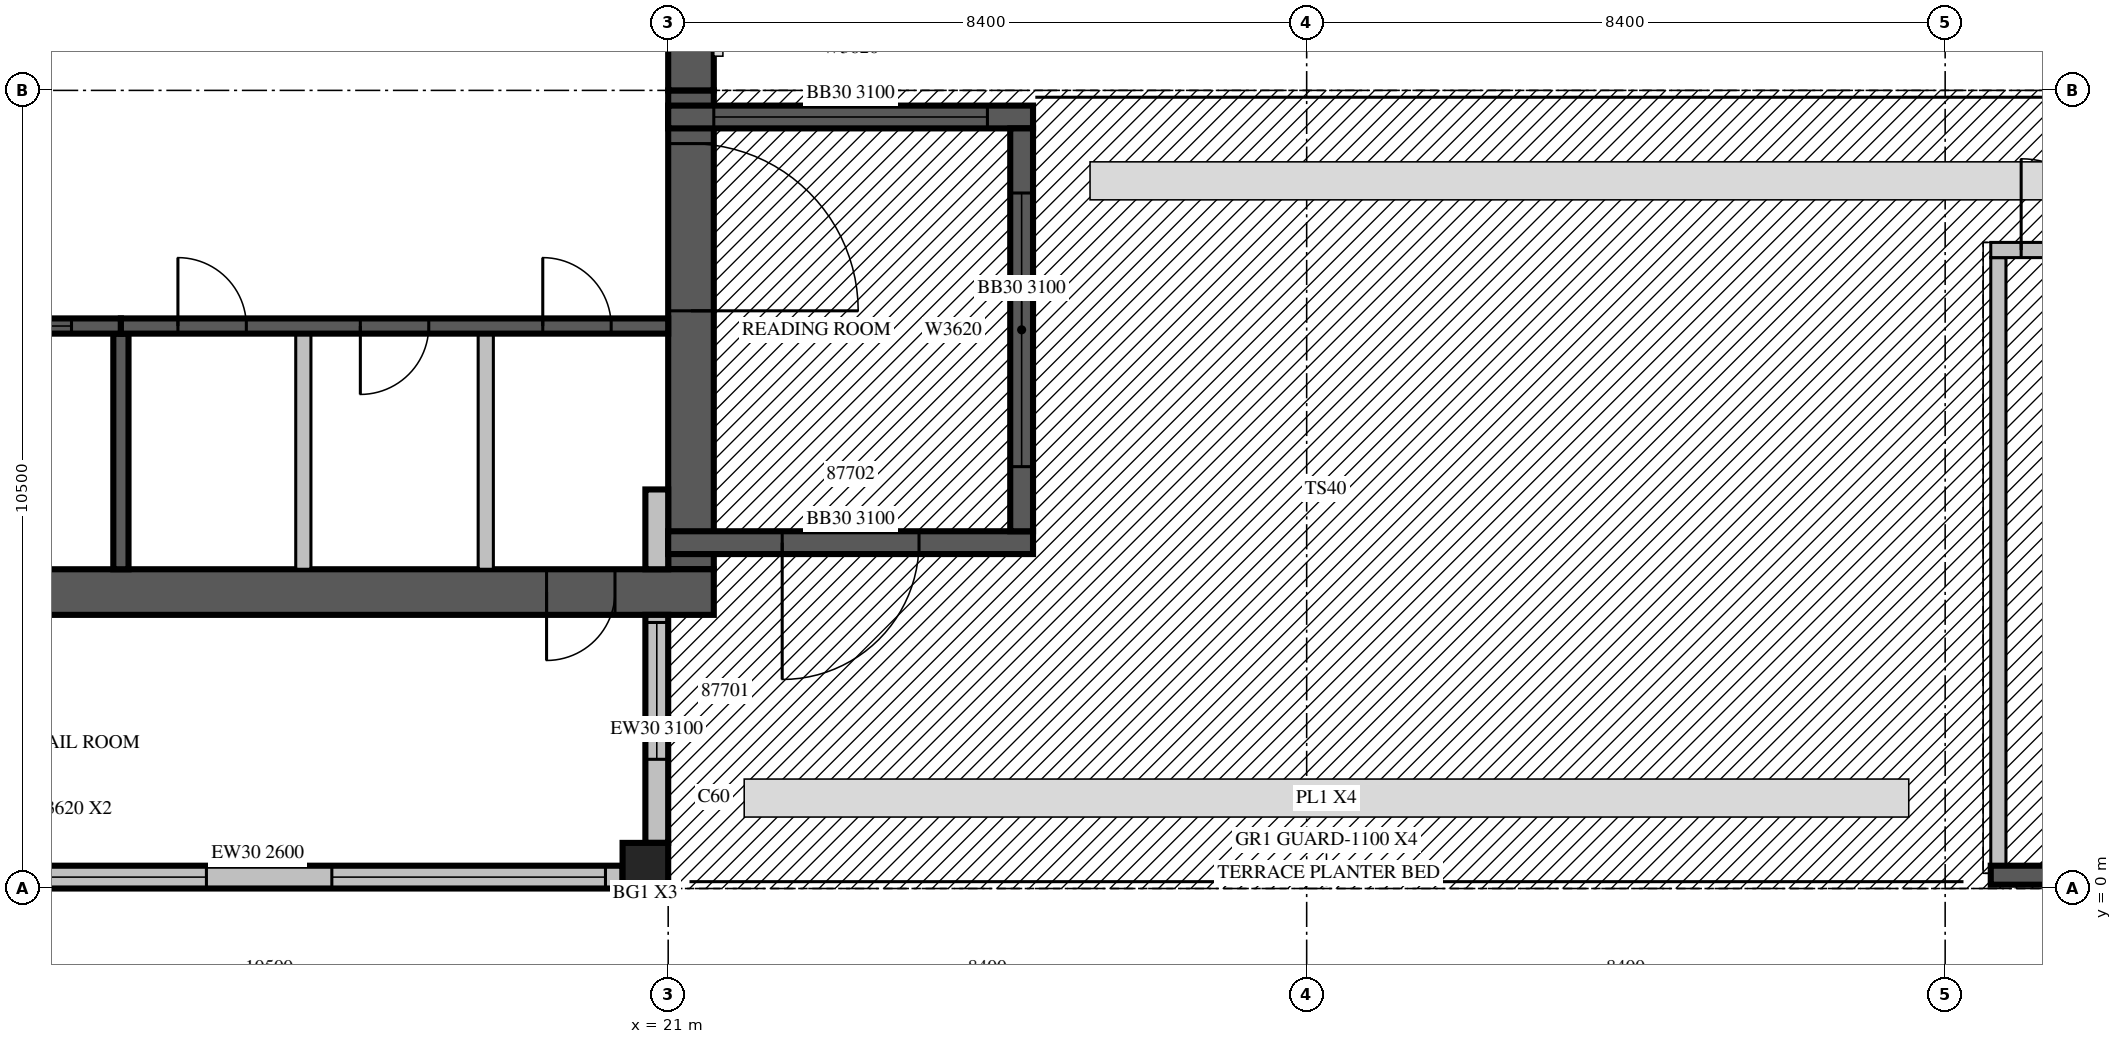
"""IFC4 building model, lengths in metres.
Left out: names, types, materials, properties, quantities, classifications, styles, units other than length and angle.
Written with IfcOpenShell. Run it as: python <this file> out.ifc"""

import sys

from ifc_helpers import new_model, si_unit, direction, frame, frame_2d, origin, origin_2d, place, context, subcontext, project, spatial, rectangle, extrude, source, transform, mapped, element, fill, save


model = new_model("IFC4")
c1 = context("Model", 3, precision=1e-05, world=origin(), true_north=direction((0.0, 1.0)))
c2 = subcontext(c1, "Body", "Model", "MODEL_VIEW")
j1 = project(units=[si_unit("LENGTHUNIT", "METRE"), si_unit("PLANEANGLEUNIT", "RADIAN")], contexts=[c1])
p1 = place(None, origin())
s1 = spatial("IfcSite", under=j1, at=p1, CompositionType="ELEMENT")
p2 = place(p1, origin())
s2 = spatial("IfcBuilding", under=s1, at=p2, CompositionType="ELEMENT")
p3 = place(p2, frame((0.0, 0.0, 330.0)))
s3 = spatial("IfcBuildingStorey", under=s2, at=p3, CompositionType="ELEMENT", Elevation=330.0)
m1 = source(origin(), c2, "Body", "SweptSolid", [
    extrude(rectangle(XDim=0.6, YDim=0.6, at=origin_2d()), origin(), (0.0, 0.0, 1.0), 3.5),
])
p4 = place(p3, frame((20.7, 0.3, 0.0), z_axis=(0.0, 0.0, 1.0), x_axis=(1.0, 0.0, 0.0)))
e1 = element("IfcColumn", 1, at=p4, inside=s3, PredefinedType="COLUMN", context=c2, shape_type="MappedRepresentation", body=[
    mapped(m1, transform((0.0, 0.0, 0.0), scale=1.0)),
])
m2 = source(origin(), c2, "Body", "SweptSolid", [
    extrude(rectangle(XDim=6.3, YDim=0.6, at=frame_2d((3.15, 0.0))), origin(), (0.0, 0.0, 1.0), 3.5),
])
p5 = place(p3, frame((21.3, 4.2, 0.0), z_axis=(0.0, 0.0, 1.0), x_axis=(0.0, 1.0, 0.0)))
e2 = element("IfcWall", 2, at=p5, inside=s3, PredefinedType="SHEAR", context=c2, shape_type="MappedRepresentation", body=[
    mapped(m2, transform((0.0, 0.0, 0.0), scale=1.0)),
])
m3 = source(origin(), c2, "Body", "SweptSolid", [
    extrude(rectangle(XDim=2.2, YDim=2.1, at=frame_2d((1.1, 1.05))), frame((0.0, 0.31, 0.0), z_axis=(0.0, -1.0, 0.0), x_axis=(1.0, 0.0, 0.0)), (0.0, 0.0, 1.0), 0.62),
])
p6 = place(p5, frame((3.4, 0.0, 0.0)))
e3 = element("IfcOpeningElement", 3, at=p6, cuts=e2, PredefinedType="OPENING", context=c2, shape_type="MappedRepresentation", body=[
    mapped(m3, transform((0.0, 0.0, 0.0), scale=1.0)),
])
m4 = source(origin(), c2, "Body", "SweptSolid", [
    extrude(rectangle(XDim=17.4, YDim=0.6, at=frame_2d((8.7, 0.0))), origin(), (0.0, 0.0, 1.0), 3.5),
])
p7 = place(p3, frame((4.2, 3.9, 0.0), z_axis=(0.0, 0.0, 1.0), x_axis=(1.0, 0.0, 0.0)))
e4 = element("IfcWall", 4, at=p7, inside=s3, PredefinedType="SHEAR", context=c2, shape_type="MappedRepresentation", body=[
    mapped(m4, transform((0.0, 0.0, 0.0), scale=1.0)),
])
m5 = source(origin(), c2, "Body", "SweptSolid", [
    extrude(rectangle(XDim=0.9, YDim=2.1, at=frame_2d((0.45, 1.05))), frame((0.0, 0.31, 0.0), z_axis=(0.0, -1.0, 0.0), x_axis=(1.0, 0.0, 0.0)), (0.0, 0.0, 1.0), 0.62),
])
p8 = place(p7, frame((15.2, 0.0, 0.0)))
e5 = element("IfcOpeningElement", 5, at=p8, cuts=e4, PredefinedType="OPENING", context=c2, shape_type="MappedRepresentation", body=[
    mapped(m5, transform((0.0, 0.0, 0.0), scale=1.0)),
])
m6 = source(origin(), c2, "Body", "SweptSolid", [
    extrude(rectangle(XDim=10.5, YDim=0.6, at=frame_2d((5.25, 0.0))), origin(), (0.0, 0.0, 1.0), 3.5),
])
p9 = place(p3, frame((21.3, 10.5, 0.0), z_axis=(0.0, 0.0, 1.0), x_axis=(0.0, 1.0, 0.0)))
e6 = element("IfcWall", 6, at=p9, inside=s3, PredefinedType="SHEAR", context=c2, shape_type="MappedRepresentation", body=[
    mapped(m6, transform((0.0, 0.0, 0.0), scale=1.0)),
])
m7 = source(origin(), c2, "Body", "SweptSolid", [
    extrude(rectangle(XDim=1.2, YDim=2.4, at=frame_2d((0.6, 1.2))), frame((0.0, 0.31, 0.0), z_axis=(0.0, -1.0, 0.0), x_axis=(1.0, 0.0, 0.0)), (0.0, 0.0, 1.0), 0.62),
])
p10 = place(p9, frame((5.7, 0.0, 0.6)))
e7 = element("IfcOpeningElement", 7, at=p10, cuts=e6, PredefinedType="OPENING", context=c2, shape_type="MappedRepresentation", body=[
    mapped(m7, transform((0.0, 0.0, 0.0), scale=1.0)),
])
p11 = place(p3, frame((10.8, 0.15, 0.0), z_axis=(0.0, 0.0, 1.0), x_axis=(1.0, 0.0, 0.0)))
e8 = element("IfcWall", 8, at=p11, inside=s3, PredefinedType="STANDARD", context=c2, shape_type="SweptSolid", body=[
    extrude(rectangle(XDim=9.6, YDim=0.3, at=frame_2d((4.8, 0.0))), origin(), (0.0, 0.0, 1.0), 2.6),
])
m8 = source(origin(), c2, "Body", "SweptSolid", [
    extrude(rectangle(XDim=3.6, YDim=2.0, at=frame_2d((1.8, 1.0))), frame((0.0, 0.16, 0.0), z_axis=(0.0, -1.0, 0.0), x_axis=(1.0, 0.0, 0.0)), (0.0, 0.0, 1.0), 0.32),
])
p12 = place(p11, frame((0.525, 0.0, 0.6)))
e9 = element("IfcOpeningElement", 9, at=p12, cuts=e8, PredefinedType="OPENING", context=c2, shape_type="MappedRepresentation", body=[
    mapped(m8, transform((0.0, 0.0, 0.0), scale=1.0)),
])
p13 = place(p11, frame((5.775, 0.0, 0.6)))
e10 = element("IfcOpeningElement", 10, at=p13, cuts=e8, PredefinedType="OPENING", context=c2, shape_type="MappedRepresentation", body=[
    mapped(m8, transform((0.0, 0.0, 0.0), scale=1.0)),
])
m9 = source(origin(), c2, "Body", "SweptSolid", [
    extrude(rectangle(XDim=3.0, YDim=0.3, at=frame_2d((1.5, 0.0))), origin(), (0.0, 0.0, 1.0), 3.1),
])
p14 = place(p3, frame((20.85, 0.6, 0.0), z_axis=(0.0, 0.0, 1.0), x_axis=(0.0, 1.0, 0.0)))
e11 = element("IfcWall", 11, at=p14, inside=s3, PredefinedType="STANDARD", context=c2, shape_type="MappedRepresentation", body=[
    mapped(m9, transform((0.0, 0.0, 0.0), scale=1.0)),
])
m10 = source(origin(), c2, "Body", "SweptSolid", [
    extrude(rectangle(XDim=1.8, YDim=2.4, at=frame_2d((0.9, 1.2))), frame((0.0, 0.16, 0.0), z_axis=(0.0, -1.0, 0.0), x_axis=(1.0, 0.0, 0.0)), (0.0, 0.0, 1.0), 0.32),
])
p15 = place(p14, frame((1.1, 0.0, 0.0)))
e12 = element("IfcOpeningElement", 12, at=p15, cuts=e11, PredefinedType="OPENING", context=c2, shape_type="MappedRepresentation", body=[
    mapped(m10, transform((0.0, 0.0, 0.0), scale=1.0)),
])
m11 = source(origin(), c2, "Body", "SweptSolid", [
    extrude(rectangle(XDim=1.05, YDim=0.3, at=frame_2d((0.525, 0.0))), origin(), (0.0, 0.0, 1.0), 3.1),
])
p16 = place(p3, frame((20.85, 4.2, 0.0), z_axis=(0.0, 0.0, 1.0), x_axis=(0.0, 1.0, 0.0)))
e13 = element("IfcWall", 13, at=p16, inside=s3, PredefinedType="STANDARD", context=c2, shape_type="MappedRepresentation", body=[
    mapped(m11, transform((0.0, 0.0, 0.0), scale=1.0)),
])
p17 = place(p3, frame((21.0, 10.15, 0.0), z_axis=(0.0, 0.0, 1.0), x_axis=(1.0, 0.0, 0.0)))
e14 = element("IfcWall", 14, at=p17, inside=s3, PredefinedType="SOLIDWALL", context=c2, shape_type="SweptSolid", body=[
    extrude(rectangle(XDim=4.8, YDim=0.3, at=frame_2d((2.4, 0.0))), origin(), (0.0, 0.0, 1.0), 3.1),
])
p18 = place(p17, frame((0.6, 0.0, 0.6)))
e15 = element("IfcOpeningElement", 15, at=p18, cuts=e14, PredefinedType="OPENING", context=c2, shape_type="MappedRepresentation", body=[
    mapped(m8, transform((0.0, 0.0, 0.0), scale=1.0)),
])
m12 = source(origin(), c2, "Body", "SweptSolid", [
    extrude(rectangle(XDim=4.8, YDim=0.3, at=frame_2d((2.4, 0.0))), origin(), (0.0, 0.0, 1.0), 3.1),
])
p19 = place(p3, frame((21.0, 4.55, 0.0), z_axis=(0.0, 0.0, 1.0), x_axis=(1.0, 0.0, 0.0)))
e16 = element("IfcWall", 16, at=p19, inside=s3, PredefinedType="SOLIDWALL", context=c2, shape_type="MappedRepresentation", body=[
    mapped(m12, transform((0.0, 0.0, 0.0), scale=1.0)),
])
p20 = place(p19, frame((1.5, 0.0, 0.0)))
e17 = element("IfcOpeningElement", 17, at=p20, cuts=e16, PredefinedType="OPENING", context=c2, shape_type="SweptSolid", body=[
    extrude(rectangle(XDim=1.8, YDim=2.1, at=frame_2d((0.9, 1.05))), frame((0.0, 0.16, 0.0), z_axis=(0.0, -1.0, 0.0), x_axis=(1.0, 0.0, 0.0)), (0.0, 0.0, 1.0), 0.32),
])
p21 = place(p3, frame((25.65, 4.7, 0.0), z_axis=(0.0, 0.0, 1.0), x_axis=(0.0, 1.0, 0.0)))
e18 = element("IfcWall", 18, at=p21, inside=s3, PredefinedType="SOLIDWALL", context=c2, shape_type="SweptSolid", body=[
    extrude(rectangle(XDim=5.3, YDim=0.3, at=frame_2d((2.65, 0.0))), origin(), (0.0, 0.0, 1.0), 3.1),
])
p22 = place(p21, frame((0.85, 0.0, 0.6)))
e19 = element("IfcOpeningElement", 19, at=p22, cuts=e18, PredefinedType="OPENING", context=c2, shape_type="MappedRepresentation", body=[
    mapped(m8, transform((0.0, 0.0, 0.0), scale=1.0)),
])
m13 = source(origin(), c2, "Body", "SweptSolid", [
    extrude(rectangle(XDim=3.1, YDim=0.2, at=frame_2d((1.55, 0.0))), origin(), (0.0, 0.0, 1.0), 3.1),
])
p23 = place(p3, frame((13.8, 4.2, 0.0), z_axis=(0.0, 0.0, 1.0), x_axis=(0.0, 1.0, 0.0)))
e20 = element("IfcWall", 20, at=p23, inside=s3, PredefinedType="SOLIDWALL", context=c2, shape_type="MappedRepresentation", body=[
    mapped(m13, transform((0.0, 0.0, 0.0), scale=1.0)),
])
m14 = source(origin(), c2, "Body", "SweptSolid", [
    extrude(rectangle(XDim=3.1, YDim=0.2, at=frame_2d((1.55, 0.0))), origin(), (0.0, 0.0, 1.0), 3.1),
])
for number, where, z_axis, x_axis in (
    (21, (16.2, 4.2, 0.0), (0.0, 0.0, 1.0), (0.0, 1.0, 0.0)),
    (22, (18.6, 4.2, 0.0), (0.0, 0.0, 1.0), (0.0, 1.0, 0.0)),
):
    element("IfcWall", number, at=place(p3, frame(where, z_axis=z_axis, x_axis=x_axis)), inside=s3, PredefinedType="PARTITIONING", context=c2, shape_type="MappedRepresentation", body=[
        mapped(m14, transform((0.0, 0.0, 0.0), scale=1.0)),
    ])
m15 = source(origin(), c2, "Body", "SweptSolid", [
    extrude(rectangle(XDim=9.6, YDim=0.2, at=frame_2d((4.8, 0.0))), origin(), (0.0, 0.0, 1.0), 3.5),
])
p24 = place(p3, frame((4.2, 7.4, 0.0), z_axis=(0.0, 0.0, 1.0), x_axis=(1.0, 0.0, 0.0)))
e23 = element("IfcWall", 23, at=p24, inside=s3, PredefinedType="SOLIDWALL", context=c2, shape_type="MappedRepresentation", body=[
    mapped(m15, transform((0.0, 0.0, 0.0), scale=1.0)),
])
m16 = source(origin(), c2, "Body", "SweptSolid", [
    extrude(rectangle(XDim=1.1, YDim=2.1, at=frame_2d((0.55, 1.05))), frame((0.0, 0.11, 0.0), z_axis=(0.0, -1.0, 0.0), x_axis=(1.0, 0.0, 0.0)), (0.0, 0.0, 1.0), 0.22),
])
p25 = place(p24, frame((0.65, 0.0, 0.0)))
e24 = element("IfcOpeningElement", 24, at=p25, cuts=e23, PredefinedType="OPENING", context=c2, shape_type="MappedRepresentation", body=[
    mapped(m16, transform((0.0, 0.0, 0.0), scale=1.0)),
])
p26 = place(p24, frame((3.05, 0.0, 0.0)))
e25 = element("IfcOpeningElement", 25, at=p26, cuts=e23, PredefinedType="OPENING", context=c2, shape_type="MappedRepresentation", body=[
    mapped(m16, transform((0.0, 0.0, 0.0), scale=1.0)),
])
p27 = place(p24, frame((5.45, 0.0, 0.0)))
e26 = element("IfcOpeningElement", 26, at=p27, cuts=e23, PredefinedType="OPENING", context=c2, shape_type="MappedRepresentation", body=[
    mapped(m16, transform((0.0, 0.0, 0.0), scale=1.0)),
])
p28 = place(p24, frame((7.85, 0.0, 0.0)))
e27 = element("IfcOpeningElement", 27, at=p28, cuts=e23, PredefinedType="OPENING", context=c2, shape_type="MappedRepresentation", body=[
    mapped(m16, transform((0.0, 0.0, 0.0), scale=1.0)),
])
m17 = source(origin(), c2, "Body", "SweptSolid", [
    extrude(rectangle(XDim=7.2, YDim=0.2, at=frame_2d((3.6, 0.0))), origin(), (0.0, 0.0, 1.0), 3.1),
])
p29 = place(p3, frame((13.8, 7.4, 0.0), z_axis=(0.0, 0.0, 1.0), x_axis=(1.0, 0.0, 0.0)))
e28 = element("IfcWall", 28, at=p29, inside=s3, PredefinedType="SOLIDWALL", context=c2, shape_type="MappedRepresentation", body=[
    mapped(m17, transform((0.0, 0.0, 0.0), scale=1.0)),
])
m18 = source(origin(), c2, "Body", "SweptSolid", [
    extrude(rectangle(XDim=0.9, YDim=2.1, at=frame_2d((0.45, 1.05))), frame((0.0, 0.11, 0.0), z_axis=(0.0, -1.0, 0.0), x_axis=(1.0, 0.0, 0.0)), (0.0, 0.0, 1.0), 0.22),
])
p30 = place(p29, frame((0.75, 0.0, 0.0)))
e29 = element("IfcOpeningElement", 29, at=p30, cuts=e28, PredefinedType="OPENING", context=c2, shape_type="MappedRepresentation", body=[
    mapped(m18, transform((0.0, 0.0, 0.0), scale=1.0)),
])
p31 = place(p29, frame((3.15, 0.0, 0.0)))
e30 = element("IfcOpeningElement", 30, at=p31, cuts=e28, PredefinedType="OPENING", context=c2, shape_type="MappedRepresentation", body=[
    mapped(m18, transform((0.0, 0.0, 0.0), scale=1.0)),
])
p32 = place(p29, frame((5.55, 0.0, 0.0)))
e31 = element("IfcOpeningElement", 31, at=p32, cuts=e28, PredefinedType="OPENING", context=c2, shape_type="MappedRepresentation", body=[
    mapped(m18, transform((0.0, 0.0, 0.0), scale=1.0)),
])
m19 = source(origin(), c2, "Body", "SweptSolid", [
    extrude(rectangle(XDim=8.0, YDim=0.2, at=frame_2d((4.0, 0.0))), origin(), (0.0, 0.0, 1.0), 3.1),
])
p33 = place(p3, frame((38.5, 0.3, 0.0), z_axis=(0.0, 0.0, 1.0), x_axis=(0.0, 1.0, 0.0)))
e32 = element("IfcWall", 32, at=p33, inside=s3, PredefinedType="PARTITIONING", context=c2, shape_type="MappedRepresentation", body=[
    mapped(m19, transform((0.0, 0.0, 0.0), scale=1.0)),
])
m20 = source(origin(), c2, "Body", "SweptSolid", [
    extrude(rectangle(XDim=5.45, YDim=0.2, at=frame_2d((2.725, 0.0))), origin(), (0.0, 0.0, 1.0), 3.1),
])
p34 = place(p3, frame((38.4, 8.4, 0.0), z_axis=(0.0, 0.0, 1.0), x_axis=(1.0, 0.0, 0.0)))
e33 = element("IfcWall", 33, at=p34, inside=s3, PredefinedType="PARTITIONING", context=c2, shape_type="MappedRepresentation", body=[
    mapped(m20, transform((0.0, 0.0, 0.0), scale=1.0)),
])
m21 = source(origin(), c2, "Body", "SweptSolid", [
    extrude(rectangle(XDim=1.2, YDim=2.1, at=frame_2d((0.6, 1.05))), frame((0.0, 0.11, 0.0), z_axis=(0.0, -1.0, 0.0), x_axis=(1.0, 0.0, 0.0)), (0.0, 0.0, 1.0), 0.22),
])
p35 = place(p34, frame((0.4, 0.0, 0.0)))
e34 = element("IfcOpeningElement", 34, at=p35, cuts=e33, PredefinedType="OPENING", context=c2, shape_type="MappedRepresentation", body=[
    mapped(m21, transform((0.0, 0.0, 0.0), scale=1.0)),
])
p36 = place(p34, frame((3.25, 0.0, 0.0)))
e35 = element("IfcOpeningElement", 35, at=p36, cuts=e33, PredefinedType="OPENING", context=c2, shape_type="MappedRepresentation", body=[
    mapped(m18, transform((0.0, 0.0, 0.0), scale=1.0)),
])
p37 = place(p3, frame((38.4, 0.175, 0.0), z_axis=(0.0, 0.0, 1.0), x_axis=(1.0, 0.0, 0.0)))
e36 = element("IfcWall", 36, at=p37, inside=s3, PredefinedType="SOLIDWALL", context=c2, shape_type="SweptSolid", body=[
    extrude(rectangle(XDim=5.45, YDim=0.25, at=frame_2d((2.725, 0.0))), origin(), (0.0, 0.0, 1.0), 3.1),
])
m22 = source(origin(), c2, "Body", "SweptSolid", [
    extrude(rectangle(XDim=3.6, YDim=2.0, at=frame_2d((1.8, 1.0))), frame((0.0, 0.03, 0.0), z_axis=(0.0, -1.0, 0.0), x_axis=(1.0, 0.0, 0.0)), (0.0, 0.0, 1.0), 0.06),
])
p38 = place(p12, origin())
e37 = element("IfcWindow", 37, at=p38, inside=s3, PartitioningType="SINGLE_PANEL", PredefinedType="WINDOW", context=c2, shape_type="MappedRepresentation", body=[
    mapped(m22, transform((0.0, 0.0, 0.0), scale=1.0)),
])
fill(e9, e37)
p39 = place(p13, origin())
e38 = element("IfcWindow", 38, at=p39, inside=s3, PartitioningType="SINGLE_PANEL", PredefinedType="WINDOW", context=c2, shape_type="MappedRepresentation", body=[
    mapped(m22, transform((0.0, 0.0, 0.0), scale=1.0)),
])
fill(e10, e38)
m23 = source(origin(), c2, "Body", "SweptSolid", [
    extrude(rectangle(XDim=1.8, YDim=2.4, at=frame_2d((0.9, 1.2))), frame((0.0, 0.025, 0.0), z_axis=(0.0, -1.0, 0.0), x_axis=(1.0, 0.0, 0.0)), (0.0, 0.0, 1.0), 0.05),
])
p40 = place(p15, origin())
e39 = element("IfcDoor", 39, at=p40, inside=s3, OperationType="SLIDING_TO_LEFT", PredefinedType="DOOR", context=c2, shape_type="MappedRepresentation", body=[
    mapped(m23, transform((0.0, 0.0, 0.0), scale=1.0)),
])
fill(e12, e39)
p41 = place(p18, origin())
e40 = element("IfcWindow", 40, at=p41, inside=s3, PartitioningType="SINGLE_PANEL", PredefinedType="WINDOW", context=c2, shape_type="MappedRepresentation", body=[
    mapped(m22, transform((0.0, 0.0, 0.0), scale=1.0)),
])
fill(e15, e40)
p42 = place(p20, origin())
e41 = element("IfcDoor", 41, at=p42, inside=s3, OperationType="DOUBLE_DOOR_SINGLE_SWING", PredefinedType="DOOR", context=c2, shape_type="SweptSolid", body=[
    extrude(rectangle(XDim=1.8, YDim=2.1, at=frame_2d((0.9, 1.05))), frame((0.0, 0.025, 0.0), z_axis=(0.0, -1.0, 0.0), x_axis=(1.0, 0.0, 0.0)), (0.0, 0.0, 1.0), 0.05),
])
fill(e17, e41)
p43 = place(p22, origin())
e42 = element("IfcWindow", 42, at=p43, inside=s3, PartitioningType="SINGLE_PANEL", PredefinedType="WINDOW", context=c2, shape_type="MappedRepresentation", body=[
    mapped(m22, transform((0.0, 0.0, 0.0), scale=1.0)),
])
fill(e19, e42)
m24 = source(origin(), c2, "Body", "SweptSolid", [
    extrude(rectangle(XDim=1.1, YDim=2.1, at=frame_2d((0.55, 1.05))), frame((0.0, 0.025, 0.0), z_axis=(0.0, -1.0, 0.0), x_axis=(1.0, 0.0, 0.0)), (0.0, 0.0, 1.0), 0.05),
])
p44 = place(p28, origin())
e43 = element("IfcDoor", 43, at=p44, inside=s3, OperationType="SLIDING_TO_LEFT", PredefinedType="DOOR", context=c2, shape_type="MappedRepresentation", body=[
    mapped(m24, transform((0.0, 0.0, 0.0), scale=1.0)),
])
fill(e27, e43)
m25 = source(origin(), c2, "Body", "SweptSolid", [
    extrude(rectangle(XDim=0.9, YDim=2.1, at=frame_2d((0.45, 1.05))), frame((0.0, 0.025, 0.0), z_axis=(0.0, -1.0, 0.0), x_axis=(1.0, 0.0, 0.0)), (0.0, 0.0, 1.0), 0.05),
])
p45 = place(p30, origin())
e44 = element("IfcDoor", 44, at=p45, inside=s3, OperationType="SINGLE_SWING_LEFT", PredefinedType="DOOR", context=c2, shape_type="MappedRepresentation", body=[
    mapped(m25, transform((0.0, 0.0, 0.0), scale=1.0)),
])
fill(e29, e44)
p46 = place(p31, origin())
e45 = element("IfcDoor", 45, at=p46, inside=s3, OperationType="SINGLE_SWING_RIGHT", PredefinedType="DOOR", context=c2, shape_type="MappedRepresentation", body=[
    mapped(m25, transform((0.0, 0.0, 0.0), scale=1.0)),
])
fill(e30, e45)
p47 = place(p32, origin())
e46 = element("IfcDoor", 46, at=p47, inside=s3, OperationType="SINGLE_SWING_LEFT", PredefinedType="DOOR", context=c2, shape_type="MappedRepresentation", body=[
    mapped(m25, transform((0.0, 0.0, 0.0), scale=1.0)),
])
fill(e31, e46)
m26 = source(origin(), c2, "Body", "SweptSolid", [
    extrude(rectangle(XDim=1.2, YDim=2.1, at=frame_2d((0.6, 1.05))), frame((0.0, 0.025, 0.0), z_axis=(0.0, -1.0, 0.0), x_axis=(1.0, 0.0, 0.0)), (0.0, 0.0, 1.0), 0.05),
])
p48 = place(p35, origin())
e47 = element("IfcDoor", 47, at=p48, inside=s3, OperationType="SINGLE_SWING_LEFT", PredefinedType="DOOR", context=c2, shape_type="MappedRepresentation", body=[
    mapped(m26, transform((0.0, 0.0, 0.0), scale=1.0)),
])
fill(e34, e47)
m27 = source(origin(), c2, "Body", "SweptSolid", [
    extrude(rectangle(XDim=2.2, YDim=2.1, at=frame_2d((1.1, 1.05))), frame((0.0, 0.025, 0.0), z_axis=(0.0, -1.0, 0.0), x_axis=(1.0, 0.0, 0.0)), (0.0, 0.0, 1.0), 0.05),
])
p49 = place(p6, origin())
e48 = element("IfcDoor", 48, at=p49, inside=s3, OperationType="DOUBLE_DOOR_SINGLE_SWING", PredefinedType="DOOR", context=c2, shape_type="MappedRepresentation", body=[
    mapped(m27, transform((0.0, 0.0, 0.0), scale=1.0)),
])
fill(e3, e48)
p50 = place(p8, origin())
e49 = element("IfcDoor", 49, at=p50, inside=s3, OperationType="SINGLE_SWING_RIGHT", PredefinedType="DOOR", context=c2, shape_type="MappedRepresentation", body=[
    mapped(m25, transform((0.0, 0.0, 0.0), scale=1.0)),
])
fill(e5, e49)
save(model, sys.argv[1])
